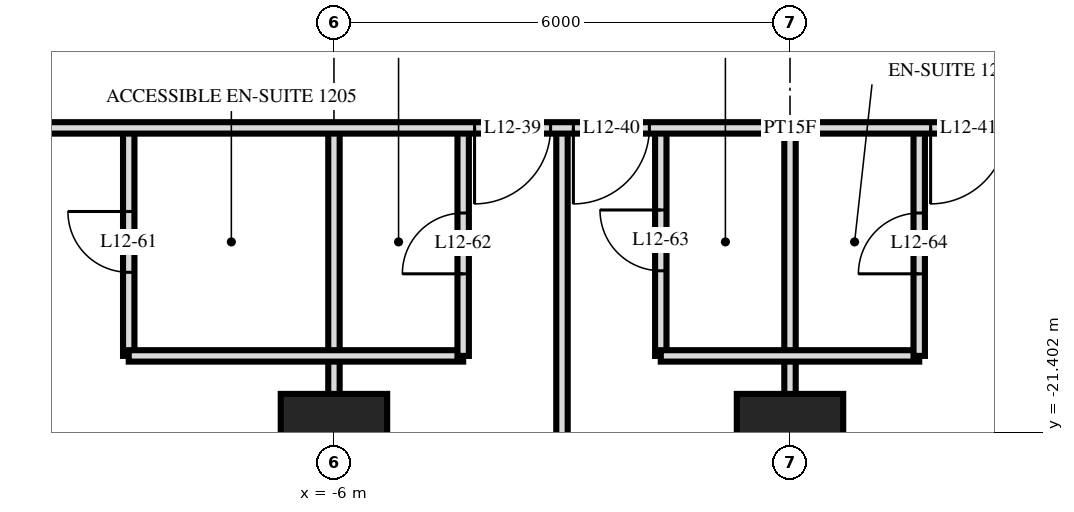
"""IFC4 building model, lengths in metres.
Left out: names, types, materials, properties, quantities, classifications, styles, units other than length and angle.
Written with IfcOpenShell. Run it as: python <this file> out.ifc"""

import sys

from ifc_helpers import new_model, si_unit, direction, frame, frame_2d, origin, origin_2d, place, context, subcontext, project, spatial, rectangle, extrude, element, fill, save


model = new_model("IFC4")
c1 = context("Model", 3, precision=1e-05, world=origin(), true_north=direction((0.0, 1.0)))
c2 = subcontext(c1, "Body", "Model", "MODEL_VIEW")
j1 = project(units=[si_unit("LENGTHUNIT", "METRE"), si_unit("PLANEANGLEUNIT", "RADIAN")], contexts=[c1])
p1 = place(None, origin())
s1 = spatial("IfcSite", under=j1, at=p1, CompositionType="ELEMENT")
p2 = place(p1, origin())
s2 = spatial("IfcBuilding", under=s1, at=p2, CompositionType="ELEMENT")
p3 = place(p2, frame((0.0, 0.0, 52.8)))
s3 = spatial("IfcBuildingStorey", under=s2, at=p3, CompositionType="ELEMENT", Elevation=52.8)
for number, where, z_axis, x_axis in (
    (1, (-6.0, -21.6, 0.0), (0.0, 0.0, 1.0), (1.0, 0.0, 0.0)),
    (2, (0.0, -21.6, 0.0), (0.0, 0.0, 1.0), (1.0, 0.0, 0.0)),
):
    element("IfcColumn", number, at=place(p3, frame(where, z_axis=z_axis, x_axis=x_axis)), inside=s3, PredefinedType="COLUMN", context=c2, shape_type="SweptSolid", body=[
        extrude(rectangle(XDim=1.4, YDim=1.4, at=origin_2d()), origin(), (0.0, 0.0, 1.0), 3.6),
    ])
p4 = place(p3, frame((1.7, -20.4, 0.0), z_axis=(0.0, 0.0, 1.0), x_axis=(0.0, 1.0, 0.0)))
e3 = element("IfcWall", 3, at=p4, inside=s3, PredefinedType="PARTITIONING", context=c2, shape_type="SweptSolid", body=[
    extrude(rectangle(XDim=3.0, YDim=0.15, at=frame_2d((1.5, 0.0))), origin(), (0.0, 0.0, 1.0), 3.32),
])
p5 = place(p4, frame((1.08, 0.0, 0.0)))
e4 = element("IfcOpeningElement", 4, at=p5, cuts=e3, PredefinedType="OPENING", context=c2, shape_type="SweptSolid", body=[
    extrude(rectangle(XDim=0.8, YDim=2.1, at=frame_2d((0.4, 1.05))), frame((0.0, 0.085, 0.0), z_axis=(0.0, -1.0, 0.0), x_axis=(1.0, 0.0, 0.0)), (0.0, 0.0, 1.0), 0.17),
])
p6 = place(p3, frame((0.0, -29.22, 0.0), z_axis=(0.0, 0.0, 1.0), x_axis=(0.0, 1.0, 0.0)))
e5 = element("IfcWall", 5, at=p6, inside=s3, PredefinedType="PARTITIONING", context=c2, shape_type="SweptSolid", body=[
    extrude(rectangle(XDim=11.82, YDim=0.15, at=frame_2d((5.91, 0.0))), origin(), (0.0, 0.0, 1.0), 3.32),
])
p7 = place(p3, frame((-1.7, -20.4, 0.0), z_axis=(0.0, 0.0, 1.0), x_axis=(0.0, 1.0, 0.0)))
e6 = element("IfcWall", 6, at=p7, inside=s3, PredefinedType="PARTITIONING", context=c2, shape_type="SweptSolid", body=[
    extrude(rectangle(XDim=3.0, YDim=0.15, at=frame_2d((1.5, 0.0))), origin(), (0.0, 0.0, 1.0), 3.32),
])
p8 = place(p7, frame((1.12, 0.0, 0.0)))
e7 = element("IfcOpeningElement", 7, at=p8, cuts=e6, PredefinedType="OPENING", context=c2, shape_type="SweptSolid", body=[
    extrude(rectangle(XDim=0.8, YDim=2.1, at=frame_2d((0.4, 1.05))), frame((0.0, 0.085, 0.0), z_axis=(0.0, -1.0, 0.0), x_axis=(1.0, 0.0, 0.0)), (0.0, 0.0, 1.0), 0.17),
])
p9 = place(p3, frame((-3.0, -29.22, 0.0), z_axis=(0.0, 0.0, 1.0), x_axis=(0.0, 1.0, 0.0)))
e8 = element("IfcWall", 8, at=p9, inside=s3, PredefinedType="PARTITIONING", context=c2, shape_type="SweptSolid", body=[
    extrude(rectangle(XDim=11.82, YDim=0.15, at=frame_2d((5.91, 0.0))), origin(), (0.0, 0.0, 1.0), 3.32),
])
p10 = place(p3, frame((-4.3, -20.4, 0.0), z_axis=(0.0, 0.0, 1.0), x_axis=(0.0, 1.0, 0.0)))
e9 = element("IfcWall", 9, at=p10, inside=s3, PredefinedType="PARTITIONING", context=c2, shape_type="SweptSolid", body=[
    extrude(rectangle(XDim=3.0, YDim=0.15, at=frame_2d((1.5, 0.0))), origin(), (0.0, 0.0, 1.0), 3.32),
])
p11 = place(p10, frame((1.08, 0.0, 0.0)))
e10 = element("IfcOpeningElement", 10, at=p11, cuts=e9, PredefinedType="OPENING", context=c2, shape_type="SweptSolid", body=[
    extrude(rectangle(XDim=0.8, YDim=2.1, at=frame_2d((0.4, 1.05))), frame((0.0, 0.085, 0.0), z_axis=(0.0, -1.0, 0.0), x_axis=(1.0, 0.0, 0.0)), (0.0, 0.0, 1.0), 0.17),
])
p12 = place(p3, frame((-6.0, -29.22, 0.0), z_axis=(0.0, 0.0, 1.0), x_axis=(0.0, 1.0, 0.0)))
e11 = element("IfcWall", 11, at=p12, inside=s3, PredefinedType="PARTITIONING", context=c2, shape_type="SweptSolid", body=[
    extrude(rectangle(XDim=11.82, YDim=0.15, at=frame_2d((5.91, 0.0))), origin(), (0.0, 0.0, 1.0), 3.32),
])
p13 = place(p3, frame((-8.7, -20.4, 0.0), z_axis=(0.0, 0.0, 1.0), x_axis=(0.0, 1.0, 0.0)))
e12 = element("IfcWall", 12, at=p13, inside=s3, PredefinedType="PARTITIONING", context=c2, shape_type="SweptSolid", body=[
    extrude(rectangle(XDim=3.0, YDim=0.15, at=frame_2d((1.5, 0.0))), origin(), (0.0, 0.0, 1.0), 3.32),
])
p14 = place(p13, frame((1.1, 0.0, 0.0)))
e13 = element("IfcOpeningElement", 13, at=p14, cuts=e12, PredefinedType="OPENING", context=c2, shape_type="SweptSolid", body=[
    extrude(rectangle(XDim=0.8, YDim=2.1, at=frame_2d((0.4, 1.05))), frame((0.0, 0.085, 0.0), z_axis=(0.0, -1.0, 0.0), x_axis=(1.0, 0.0, 0.0)), (0.0, 0.0, 1.0), 0.17),
])
p15 = place(p3, frame((-8.7, -20.4, 0.0), z_axis=(0.0, 0.0, 1.0), x_axis=(1.0, 0.0, 0.0)))
e14 = element("IfcWall", 14, at=p15, inside=s3, PredefinedType="PARTITIONING", context=c2, shape_type="SweptSolid", body=[
    extrude(rectangle(XDim=4.4, YDim=0.15, at=frame_2d((2.2, 0.0))), origin(), (0.0, 0.0, 1.0), 3.32),
])
p16 = place(p3, frame((-1.7, -20.4, 0.0), z_axis=(0.0, 0.0, 1.0), x_axis=(1.0, 0.0, 0.0)))
e15 = element("IfcWall", 15, at=p16, inside=s3, PredefinedType="PARTITIONING", context=c2, shape_type="SweptSolid", body=[
    extrude(rectangle(XDim=3.4, YDim=0.15, at=frame_2d((1.7, 0.0))), origin(), (0.0, 0.0, 1.0), 3.32),
])
p17 = place(p3, frame((-33.12, -17.4, 0.0), z_axis=(0.0, 0.0, 1.0), x_axis=(1.0, 0.0, 0.0)))
e16 = element("IfcWall", 16, at=p17, inside=s3, PredefinedType="PARTITIONING", context=c2, shape_type="SweptSolid", body=[
    extrude(rectangle(XDim=66.24, YDim=0.15, at=frame_2d((33.12, 0.0))), origin(), (0.0, 0.0, 1.0), 3.32),
])
p18 = place(p17, frame((9.27, 0.0, 0.0)))
e17 = element("IfcOpeningElement", 17, at=p18, cuts=e16, PredefinedType="OPENING", context=c2, shape_type="SweptSolid", body=[
    extrude(rectangle(XDim=1.0, YDim=2.1, at=frame_2d((0.5, 1.05))), frame((0.0, 0.085, 0.0), z_axis=(0.0, -1.0, 0.0), x_axis=(1.0, 0.0, 0.0)), (0.0, 0.0, 1.0), 0.17),
])
p19 = place(p17, frame((13.97, 0.0, 0.0)))
e18 = element("IfcOpeningElement", 18, at=p19, cuts=e16, PredefinedType="OPENING", context=c2, shape_type="SweptSolid", body=[
    extrude(rectangle(XDim=1.0, YDim=2.1, at=frame_2d((0.5, 1.05))), frame((0.0, 0.085, 0.0), z_axis=(0.0, -1.0, 0.0), x_axis=(1.0, 0.0, 0.0)), (0.0, 0.0, 1.0), 0.17),
])
p20 = place(p17, frame((15.27, 0.0, 0.0)))
e19 = element("IfcOpeningElement", 19, at=p20, cuts=e16, PredefinedType="OPENING", context=c2, shape_type="SweptSolid", body=[
    extrude(rectangle(XDim=1.0, YDim=2.1, at=frame_2d((0.5, 1.05))), frame((0.0, 0.085, 0.0), z_axis=(0.0, -1.0, 0.0), x_axis=(1.0, 0.0, 0.0)), (0.0, 0.0, 1.0), 0.17),
])
p21 = place(p17, frame((19.97, 0.0, 0.0)))
e20 = element("IfcOpeningElement", 20, at=p21, cuts=e16, PredefinedType="OPENING", context=c2, shape_type="SweptSolid", body=[
    extrude(rectangle(XDim=1.0, YDim=2.1, at=frame_2d((0.5, 1.05))), frame((0.0, 0.085, 0.0), z_axis=(0.0, -1.0, 0.0), x_axis=(1.0, 0.0, 0.0)), (0.0, 0.0, 1.0), 0.17),
])
p22 = place(p17, frame((22.27, 0.0, 0.0)))
e21 = element("IfcOpeningElement", 21, at=p22, cuts=e16, PredefinedType="OPENING", context=c2, shape_type="SweptSolid", body=[
    extrude(rectangle(XDim=1.0, YDim=2.1, at=frame_2d((0.5, 1.05))), frame((0.0, 0.085, 0.0), z_axis=(0.0, -1.0, 0.0), x_axis=(1.0, 0.0, 0.0)), (0.0, 0.0, 1.0), 0.17),
])
p23 = place(p17, frame((28.97, 0.0, 0.0)))
e22 = element("IfcOpeningElement", 22, at=p23, cuts=e16, PredefinedType="OPENING", context=c2, shape_type="SweptSolid", body=[
    extrude(rectangle(XDim=1.0, YDim=2.1, at=frame_2d((0.5, 1.05))), frame((0.0, 0.085, 0.0), z_axis=(0.0, -1.0, 0.0), x_axis=(1.0, 0.0, 0.0)), (0.0, 0.0, 1.0), 0.17),
])
p24 = place(p17, frame((30.27, 0.0, 0.0)))
e23 = element("IfcOpeningElement", 23, at=p24, cuts=e16, PredefinedType="OPENING", context=c2, shape_type="SweptSolid", body=[
    extrude(rectangle(XDim=1.0, YDim=2.1, at=frame_2d((0.5, 1.05))), frame((0.0, 0.085, 0.0), z_axis=(0.0, -1.0, 0.0), x_axis=(1.0, 0.0, 0.0)), (0.0, 0.0, 1.0), 0.17),
])
p25 = place(p17, frame((34.97, 0.0, 0.0)))
e24 = element("IfcOpeningElement", 24, at=p25, cuts=e16, PredefinedType="OPENING", context=c2, shape_type="SweptSolid", body=[
    extrude(rectangle(XDim=1.0, YDim=2.1, at=frame_2d((0.5, 1.05))), frame((0.0, 0.085, 0.0), z_axis=(0.0, -1.0, 0.0), x_axis=(1.0, 0.0, 0.0)), (0.0, 0.0, 1.0), 0.17),
])
p26 = place(p17, frame((36.27, 0.0, 0.0)))
e25 = element("IfcOpeningElement", 25, at=p26, cuts=e16, PredefinedType="OPENING", context=c2, shape_type="SweptSolid", body=[
    extrude(rectangle(XDim=1.0, YDim=2.1, at=frame_2d((0.5, 1.05))), frame((0.0, 0.085, 0.0), z_axis=(0.0, -1.0, 0.0), x_axis=(1.0, 0.0, 0.0)), (0.0, 0.0, 1.0), 0.17),
])
p27 = place(p17, frame((39.82, 0.0, 0.0)))
e26 = element("IfcOpeningElement", 26, at=p27, cuts=e16, PredefinedType="OPENING", context=c2, shape_type="SweptSolid", body=[
    extrude(rectangle(XDim=1.0, YDim=2.1, at=frame_2d((0.5, 1.05))), frame((0.0, 0.085, 0.0), z_axis=(0.0, -1.0, 0.0), x_axis=(1.0, 0.0, 0.0)), (0.0, 0.0, 1.0), 0.17),
])
p28 = place(p17, frame((51.27, 0.0, 0.0)))
e27 = element("IfcOpeningElement", 27, at=p28, cuts=e16, PredefinedType="OPENING", context=c2, shape_type="SweptSolid", body=[
    extrude(rectangle(XDim=1.0, YDim=2.1, at=frame_2d((0.5, 1.05))), frame((0.0, 0.085, 0.0), z_axis=(0.0, -1.0, 0.0), x_axis=(1.0, 0.0, 0.0)), (0.0, 0.0, 1.0), 0.17),
])
p29 = place(p17, frame((4.42, 0.0, 0.0)))
e28 = element("IfcOpeningElement", 28, at=p29, cuts=e16, PredefinedType="OPENING", context=c2, shape_type="SweptSolid", body=[
    extrude(rectangle(XDim=1.0, YDim=2.1, at=frame_2d((0.5, 1.05))), frame((0.0, 0.085, 0.0), z_axis=(0.0, -1.0, 0.0), x_axis=(1.0, 0.0, 0.0)), (0.0, 0.0, 1.0), 0.17),
])
p30 = place(p17, frame((54.82, 0.0, 0.0)))
e29 = element("IfcOpeningElement", 29, at=p30, cuts=e16, PredefinedType="OPENING", context=c2, shape_type="SweptSolid", body=[
    extrude(rectangle(XDim=1.0, YDim=2.1, at=frame_2d((0.5, 1.05))), frame((0.0, 0.085, 0.0), z_axis=(0.0, -1.0, 0.0), x_axis=(1.0, 0.0, 0.0)), (0.0, 0.0, 1.0), 0.17),
])
p31 = place(p23, frame((0.5, 0.0, 0.0), z_axis=(0.0, 0.0, 1.0), x_axis=(-1.0, 0.0, 0.0)))
e30 = element("IfcDoor", 30, at=p31, inside=s3, OperationType="SINGLE_SWING_LEFT", PredefinedType="DOOR", context=c2, shape_type="SweptSolid", body=[
    extrude(rectangle(XDim=1.0, YDim=2.1, at=frame_2d((0.0, 1.05))), frame((0.0, -0.025, 0.0), z_axis=(0.0, 1.0, 0.0), x_axis=(-1.0, 0.0, 0.0)), (0.0, 0.0, 1.0), 0.05),
])
fill(e22, e30)
p32 = place(p24, frame((0.5, 0.0, 0.0), z_axis=(0.0, 0.0, 1.0), x_axis=(-1.0, 0.0, 0.0)))
e31 = element("IfcDoor", 31, at=p32, inside=s3, OperationType="SINGLE_SWING_LEFT", PredefinedType="DOOR", context=c2, shape_type="SweptSolid", body=[
    extrude(rectangle(XDim=1.0, YDim=2.1, at=frame_2d((0.0, 1.05))), frame((0.0, -0.025, 0.0), z_axis=(0.0, 1.0, 0.0), x_axis=(-1.0, 0.0, 0.0)), (0.0, 0.0, 1.0), 0.05),
])
fill(e23, e31)
p33 = place(p25, frame((0.5, 0.0, 0.0), z_axis=(0.0, 0.0, 1.0), x_axis=(-1.0, 0.0, 0.0)))
e32 = element("IfcDoor", 32, at=p33, inside=s3, OperationType="SINGLE_SWING_LEFT", PredefinedType="DOOR", context=c2, shape_type="SweptSolid", body=[
    extrude(rectangle(XDim=1.0, YDim=2.1, at=frame_2d((0.0, 1.05))), frame((0.0, -0.025, 0.0), z_axis=(0.0, 1.0, 0.0), x_axis=(-1.0, 0.0, 0.0)), (0.0, 0.0, 1.0), 0.05),
])
fill(e24, e32)
p34 = place(p14, origin())
e33 = element("IfcDoor", 33, at=p34, inside=s3, OperationType="SINGLE_SWING_LEFT", PredefinedType="DOOR", context=c2, shape_type="SweptSolid", body=[
    extrude(rectangle(XDim=0.8, YDim=2.1, at=frame_2d((0.4, 1.05))), frame((0.0, 0.025, 0.0), z_axis=(0.0, -1.0, 0.0), x_axis=(1.0, 0.0, 0.0)), (0.0, 0.0, 1.0), 0.05),
])
fill(e13, e33)
p35 = place(p11, origin())
e34 = element("IfcDoor", 34, at=p35, inside=s3, OperationType="SINGLE_SWING_RIGHT", PredefinedType="DOOR", context=c2, shape_type="SweptSolid", body=[
    extrude(rectangle(XDim=0.8, YDim=2.1, at=frame_2d((0.4, 1.05))), frame((0.0, 0.025, 0.0), z_axis=(0.0, -1.0, 0.0), x_axis=(1.0, 0.0, 0.0)), (0.0, 0.0, 1.0), 0.05),
])
fill(e10, e34)
p36 = place(p8, origin())
e35 = element("IfcDoor", 35, at=p36, inside=s3, OperationType="SINGLE_SWING_LEFT", PredefinedType="DOOR", context=c2, shape_type="SweptSolid", body=[
    extrude(rectangle(XDim=0.8, YDim=2.1, at=frame_2d((0.4, 1.05))), frame((0.0, 0.025, 0.0), z_axis=(0.0, -1.0, 0.0), x_axis=(1.0, 0.0, 0.0)), (0.0, 0.0, 1.0), 0.05),
])
fill(e7, e35)
p37 = place(p5, origin())
e36 = element("IfcDoor", 36, at=p37, inside=s3, OperationType="SINGLE_SWING_RIGHT", PredefinedType="DOOR", context=c2, shape_type="SweptSolid", body=[
    extrude(rectangle(XDim=0.8, YDim=2.1, at=frame_2d((0.4, 1.05))), frame((0.0, 0.025, 0.0), z_axis=(0.0, -1.0, 0.0), x_axis=(1.0, 0.0, 0.0)), (0.0, 0.0, 1.0), 0.05),
])
fill(e4, e36)
save(model, sys.argv[1])
